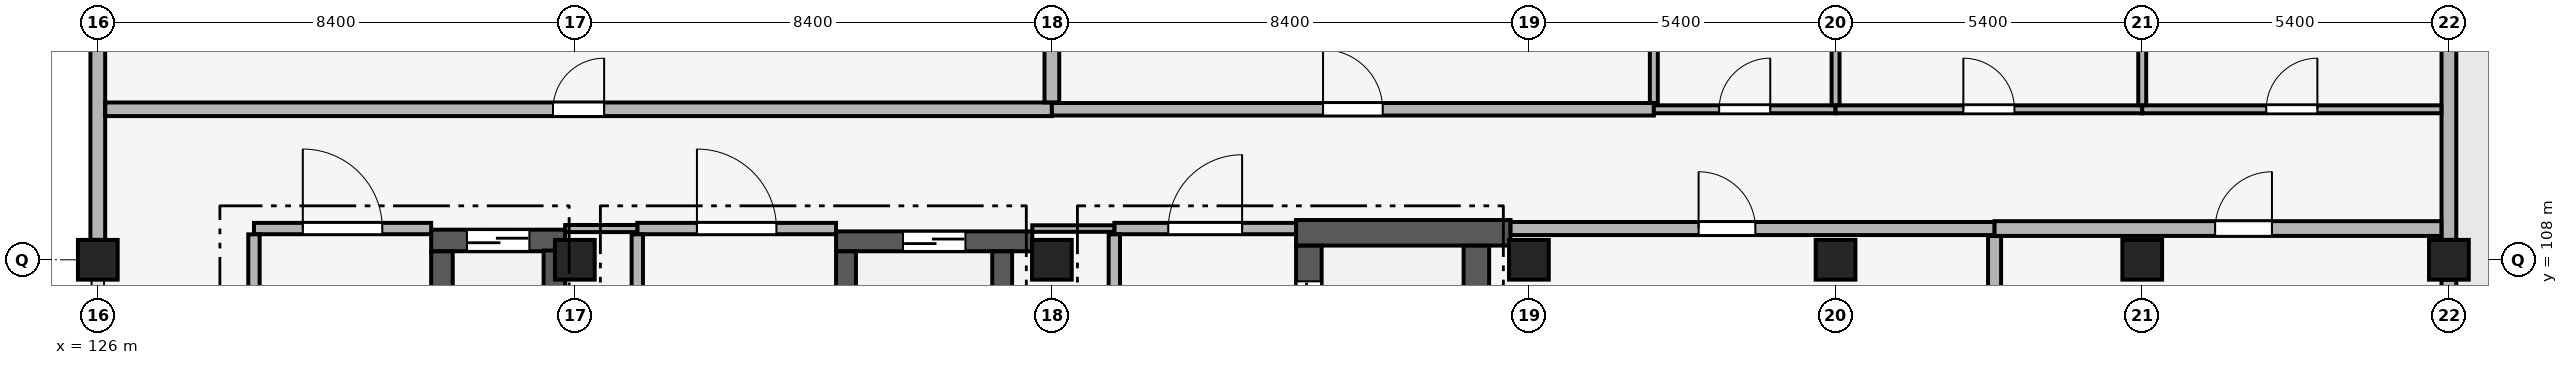
"""IFC4 building model, lengths in metres.
Left out: names, types, materials, properties, quantities, classifications, styles, units other than length and angle.
Written with IfcOpenShell. Run it as: python <this file> out.ifc"""

import sys

from ifc_helpers import new_model, si_unit, direction, frame, frame_2d, origin, origin_2d, place, context, subcontext, project, spatial, rectangle, extrude, element, fill, save


model = new_model("IFC4")
c1 = context("Model", 3, precision=1e-05, world=origin(), true_north=direction((0.0, 1.0)))
c2 = subcontext(c1, "Body", "Model", "MODEL_VIEW")
j1 = project(units=[si_unit("LENGTHUNIT", "METRE"), si_unit("PLANEANGLEUNIT", "RADIAN")], contexts=[c1])
p1 = place(None, origin())
s1 = spatial("IfcSite", under=j1, at=p1, CompositionType="ELEMENT")
p2 = place(p1, origin())
s2 = spatial("IfcBuilding", under=s1, at=p2, CompositionType="ELEMENT")
p3 = place(p2, frame((0.0, 0.0, 29.4)))
s3 = spatial("IfcBuildingStorey", under=s2, at=p3, CompositionType="ELEMENT", Elevation=29.4)
for number, where, z_axis, x_axis in (
    (1, (126.0, 108.0, 0.0), (0.0, 0.0, 1.0), (1.0, 0.0, 0.0)),
    (2, (134.4, 108.0, 0.0), (0.0, 0.0, 1.0), (1.0, 0.0, 0.0)),
    (3, (142.8, 108.0, 0.0), (0.0, 0.0, 1.0), (1.0, 0.0, 0.0)),
    (4, (151.2, 108.0, 0.0), (0.0, 0.0, 1.0), (1.0, 0.0, 0.0)),
    (5, (156.6, 108.0, 0.0), (0.0, 0.0, 1.0), (1.0, 0.0, 0.0)),
    (6, (162.0, 108.0, 0.0), (0.0, 0.0, 1.0), (1.0, 0.0, 0.0)),
    (7, (167.4, 108.0, 0.0), (0.0, 0.0, 1.0), (1.0, 0.0, 0.0)),
):
    element("IfcColumn", number, at=place(p3, frame(where, z_axis=z_axis, x_axis=x_axis)), inside=s3, PredefinedType="COLUMN", context=c2, shape_type="SweptSolid", body=[
        extrude(rectangle(XDim=0.7, YDim=0.7, at=origin_2d()), origin(), (0.0, 0.0, 1.0), 4.2),
    ])
for number, where, z_axis, x_axis in (
    (8, (126.0, 108.35, 0.0), (0.0, 0.0, 1.0), (0.0, 1.0, 0.0)),
    (9, (167.4, 113.05, 0.0), (0.0, 0.0, 1.0), (0.0, -1.0, 0.0)),
):
    element("IfcWall", number, at=place(p3, frame(where, z_axis=z_axis, x_axis=x_axis)), inside=s3, PredefinedType="SOLIDWALL", context=c2, shape_type="SweptSolid", body=[
        extrude(rectangle(XDim=4.7, YDim=0.26, at=frame_2d((2.35, 0.0))), origin(), (0.0, 0.0, 1.0), 3.4),
    ])
p4 = place(p3, frame((167.4, 107.65, 0.0), z_axis=(0.0, 0.0, 1.0), x_axis=(0.0, -1.0, 0.0)))
e10 = element("IfcWall", 10, at=p4, inside=s3, PredefinedType="SOLIDWALL", context=c2, shape_type="SweptSolid", body=[
    extrude(rectangle(XDim=7.7, YDim=0.26, at=frame_2d((3.85, 0.0))), origin(), (0.0, 0.0, 1.0), 3.25),
])
p5 = place(p4, frame((2.95, 0.0, 0.0)))
e11 = element("IfcOpeningElement", 11, at=p5, cuts=e10, PredefinedType="OPENING", context=c2, shape_type="SweptSolid", body=[
    extrude(rectangle(XDim=1.8, YDim=2.2, at=frame_2d((0.9, 1.1))), frame((0.0, 0.145, 0.0), z_axis=(0.0, -1.0, 0.0), x_axis=(1.0, 0.0, 0.0)), (0.0, 0.0, 1.0), 0.29),
])
p6 = place(p3, frame((131.87, 108.34, 0.0), z_axis=(0.0, 0.0, 1.0), x_axis=(1.0, 0.0, 0.0)))
e12 = element("IfcWall", 12, at=p6, inside=s3, PredefinedType="SHEAR", context=c2, shape_type="SweptSolid", body=[
    extrude(rectangle(XDim=2.36, YDim=0.38, at=frame_2d((1.18, 0.0))), origin(), (0.0, 0.0, 1.0), 3.95),
])
p7 = place(p6, frame((0.63, 0.0, 0.0)))
e13 = element("IfcOpeningElement", 13, at=p7, cuts=e12, PredefinedType="OPENING", context=c2, shape_type="SweptSolid", body=[
    extrude(rectangle(XDim=1.1, YDim=2.15, at=frame_2d((0.55, 1.075))), frame((0.0, 0.205, 0.0), z_axis=(0.0, -1.0, 0.0), x_axis=(1.0, 0.0, 0.0)), (0.0, 0.0, 1.0), 0.41),
])
p8 = place(p3, frame((132.06, 106.093, 0.0), z_axis=(0.0, 0.0, 1.0), x_axis=(0.0, 1.0, 0.0)))
e14 = element("IfcWall", 14, at=p8, inside=s3, PredefinedType="SHEAR", context=c2, shape_type="SweptSolid", body=[
    extrude(rectangle(XDim=2.055, YDim=0.38, at=frame_2d((1.027, 0.0))), origin(), (0.0, 0.0, 1.0), 3.95),
])
p9 = place(p3, frame((134.04, 106.093, 0.0), z_axis=(0.0, 0.0, 1.0), x_axis=(0.0, 1.0, 0.0)))
e15 = element("IfcWall", 15, at=p9, inside=s3, PredefinedType="SHEAR", context=c2, shape_type="SweptSolid", body=[
    extrude(rectangle(XDim=2.07, YDim=0.38, at=frame_2d((1.035, 0.0))), origin(), (0.0, 0.0, 1.0), 3.95),
])
p10 = place(p3, frame((139.0, 108.325, 0.0), z_axis=(0.0, 0.0, 1.0), x_axis=(1.0, 0.0, 0.0)))
e16 = element("IfcWall", 16, at=p10, inside=s3, PredefinedType="SHEAR", context=c2, shape_type="SweptSolid", body=[
    extrude(rectangle(XDim=3.455, YDim=0.35, at=frame_2d((1.728, 0.0))), origin(), (0.0, 0.0, 1.0), 3.95),
])
p11 = place(p10, frame((1.178, 0.0, 0.0)))
e17 = element("IfcOpeningElement", 17, at=p11, cuts=e16, PredefinedType="OPENING", context=c2, shape_type="SweptSolid", body=[
    extrude(rectangle(XDim=1.1, YDim=2.15, at=frame_2d((0.55, 1.075))), frame((0.0, 0.19, 0.0), z_axis=(0.0, -1.0, 0.0), x_axis=(1.0, 0.0, 0.0)), (0.0, 0.0, 1.0), 0.38),
])
for number, where, z_axis, x_axis in (
    (18, (139.175, 106.093, 0.0), (0.0, 0.0, 1.0), (0.0, 1.0, 0.0)),
    (19, (141.925, 106.093, 0.0), (0.0, 0.0, 1.0), (0.0, 1.0, 0.0)),
):
    element("IfcWall", number, at=place(p3, frame(where, z_axis=z_axis, x_axis=x_axis)), inside=s3, PredefinedType="SHEAR", context=c2, shape_type="SweptSolid", body=[
        extrude(rectangle(XDim=2.055, YDim=0.35, at=frame_2d((1.027, 0.0))), origin(), (0.0, 0.0, 1.0), 3.95),
    ])
p12 = place(p3, frame((147.1, 108.475, 0.0), z_axis=(0.0, 0.0, 1.0), x_axis=(1.0, 0.0, 0.0)))
e20 = element("IfcWall", 20, at=p12, inside=s3, PredefinedType="SHEAR", context=c2, shape_type="SweptSolid", body=[
    extrude(rectangle(XDim=3.777, YDim=0.45, at=frame_2d((1.888, 0.0))), origin(), (0.0, 0.0, 1.0), 3.95),
])
p13 = place(p3, frame((147.325, 105.793, 0.0), z_axis=(0.0, 0.0, 1.0), x_axis=(0.0, 1.0, 0.0)))
e21 = element("IfcWall", 21, at=p13, inside=s3, PredefinedType="SHEAR", context=c2, shape_type="SweptSolid", body=[
    extrude(rectangle(XDim=2.455, YDim=0.45, at=frame_2d((1.228, 0.0))), origin(), (0.0, 0.0, 1.0), 3.95),
])
p14 = place(p13, frame((0.627, 0.0, 0.0)))
e22 = element("IfcOpeningElement", 22, at=p14, cuts=e21, PredefinedType="OPENING", context=c2, shape_type="SweptSolid", body=[
    extrude(rectangle(XDim=1.2, YDim=2.15, at=frame_2d((0.6, 1.075))), frame((0.0, 0.24, 0.0), z_axis=(0.0, -1.0, 0.0), x_axis=(1.0, 0.0, 0.0)), (0.0, 0.0, 1.0), 0.48),
])
p15 = place(p3, frame((150.275, 105.793, 0.0), z_axis=(0.0, 0.0, 1.0), x_axis=(0.0, 1.0, 0.0)))
e23 = element("IfcWall", 23, at=p15, inside=s3, PredefinedType="SHEAR", context=c2, shape_type="SweptSolid", body=[
    extrude(rectangle(XDim=2.455, YDim=0.45, at=frame_2d((1.228, 0.0))), origin(), (0.0, 0.0, 1.0), 3.95),
])
p16 = place(p3, frame((128.75, 108.55, 0.0), z_axis=(0.0, 0.0, 1.0), x_axis=(1.0, 0.0, 0.0)))
e24 = element("IfcWall", 24, at=p16, inside=s3, PredefinedType="PARTITIONING", context=c2, shape_type="SweptSolid", body=[
    extrude(rectangle(XDim=3.12, YDim=0.2, at=frame_2d((1.56, 0.0))), origin(), (0.0, 0.0, 1.0), 3.95),
])
p17 = place(p16, frame((0.86, 0.0, 0.0)))
e25 = element("IfcOpeningElement", 25, at=p17, cuts=e24, PredefinedType="OPENING", context=c2, shape_type="SweptSolid", body=[
    extrude(rectangle(XDim=1.4, YDim=2.2, at=frame_2d((0.7, 1.1))), frame((0.0, 0.115, 0.0), z_axis=(0.0, -1.0, 0.0), x_axis=(1.0, 0.0, 0.0)), (0.0, 0.0, 1.0), 0.23),
])
p18 = place(p3, frame((135.5, 108.55, 0.0), z_axis=(0.0, 0.0, 1.0), x_axis=(1.0, 0.0, 0.0)))
e26 = element("IfcWall", 26, at=p18, inside=s3, PredefinedType="PARTITIONING", context=c2, shape_type="SweptSolid", body=[
    extrude(rectangle(XDim=3.5, YDim=0.2, at=frame_2d((1.75, 0.0))), origin(), (0.0, 0.0, 1.0), 3.95),
])
p19 = place(p18, frame((1.05, 0.0, 0.0)))
e27 = element("IfcOpeningElement", 27, at=p19, cuts=e26, PredefinedType="OPENING", context=c2, shape_type="SweptSolid", body=[
    extrude(rectangle(XDim=1.4, YDim=2.2, at=frame_2d((0.7, 1.1))), frame((0.0, 0.115, 0.0), z_axis=(0.0, -1.0, 0.0), x_axis=(1.0, 0.0, 0.0)), (0.0, 0.0, 1.0), 0.23),
])
p20 = place(p3, frame((143.9, 108.55, 0.0), z_axis=(0.0, 0.0, 1.0), x_axis=(1.0, 0.0, 0.0)))
e28 = element("IfcWall", 28, at=p20, inside=s3, PredefinedType="PARTITIONING", context=c2, shape_type="SweptSolid", body=[
    extrude(rectangle(XDim=3.2, YDim=0.2, at=frame_2d((1.6, 0.0))), origin(), (0.0, 0.0, 1.0), 3.95),
])
p21 = place(p20, frame((0.95, 0.0, 0.0)))
e29 = element("IfcOpeningElement", 29, at=p21, cuts=e28, PredefinedType="OPENING", context=c2, shape_type="SweptSolid", body=[
    extrude(rectangle(XDim=1.3, YDim=2.2, at=frame_2d((0.65, 1.1))), frame((0.0, 0.115, 0.0), z_axis=(0.0, -1.0, 0.0), x_axis=(1.0, 0.0, 0.0)), (0.0, 0.0, 1.0), 0.23),
])
p22 = place(p3, frame((134.23, 108.55, 0.0), z_axis=(0.0, 0.0, 1.0), x_axis=(1.0, 0.0, 0.0)))
e30 = element("IfcWall", 30, at=p22, inside=s3, PredefinedType="PARTITIONING", context=c2, shape_type="SweptSolid", body=[
    extrude(rectangle(XDim=1.27, YDim=0.125, at=frame_2d((0.635, 0.0))), origin(), (0.0, 0.0, 1.0), 3.4),
])
p23 = place(p3, frame((142.455, 108.55, 0.0), z_axis=(0.0, 0.0, 1.0), x_axis=(1.0, 0.0, 0.0)))
e31 = element("IfcWall", 31, at=p23, inside=s3, PredefinedType="PARTITIONING", context=c2, shape_type="SweptSolid", body=[
    extrude(rectangle(XDim=1.445, YDim=0.115, at=frame_2d((0.722, 0.0))), origin(), (0.0, 0.0, 1.0), 3.4),
])
p24 = place(p3, frame((150.877, 108.55, 0.0), z_axis=(0.0, 0.0, 1.0), x_axis=(1.0, 0.0, 0.0)))
e32 = element("IfcWall", 32, at=p24, inside=s3, PredefinedType="SOLIDWALL", context=c2, shape_type="SweptSolid", body=[
    extrude(rectangle(XDim=8.523, YDim=0.23, at=frame_2d((4.261, 0.0))), origin(), (0.0, 0.0, 1.0), 3.4),
])
p25 = place(p24, frame((3.311, 0.0, 0.0)))
e33 = element("IfcOpeningElement", 33, at=p25, cuts=e32, PredefinedType="OPENING", context=c2, shape_type="SweptSolid", body=[
    extrude(rectangle(XDim=1.0, YDim=2.2, at=frame_2d((0.5, 1.1))), frame((0.0, 0.13, 0.0), z_axis=(0.0, -1.0, 0.0), x_axis=(1.0, 0.0, 0.0)), (0.0, 0.0, 1.0), 0.26),
])
p26 = place(p3, frame((159.4, 108.55, 0.0), z_axis=(0.0, 0.0, 1.0), x_axis=(1.0, 0.0, 0.0)))
e34 = element("IfcWall", 34, at=p26, inside=s3, PredefinedType="PARTITIONING", context=c2, shape_type="SweptSolid", body=[
    extrude(rectangle(XDim=7.868, YDim=0.26, at=frame_2d((3.934, 0.0))), origin(), (0.0, 0.0, 1.0), 3.4),
])
p27 = place(p26, frame((3.884, 0.0, 0.0)))
e35 = element("IfcOpeningElement", 35, at=p27, cuts=e34, PredefinedType="OPENING", context=c2, shape_type="SweptSolid", body=[
    extrude(rectangle(XDim=1.0, YDim=2.1, at=frame_2d((0.5, 1.05))), frame((0.0, 0.145, 0.0), z_axis=(0.0, -1.0, 0.0), x_axis=(1.0, 0.0, 0.0)), (0.0, 0.0, 1.0), 0.29),
])
p28 = place(p3, frame((126.132, 110.65, 0.0), z_axis=(0.0, 0.0, 1.0), x_axis=(1.0, 0.0, 0.0)))
e36 = element("IfcWall", 36, at=p28, inside=s3, PredefinedType="PARTITIONING", context=c2, shape_type="SweptSolid", body=[
    extrude(rectangle(XDim=16.668, YDim=0.24, at=frame_2d((8.334, 0.0))), origin(), (0.0, 0.0, 1.0), 3.4),
])
p29 = place(p28, frame((7.884, 0.0, 0.0)))
e37 = element("IfcOpeningElement", 37, at=p29, cuts=e36, PredefinedType="OPENING", context=c2, shape_type="SweptSolid", body=[
    extrude(rectangle(XDim=0.9, YDim=2.1, at=frame_2d((0.45, 1.05))), frame((0.0, 0.135, 0.0), z_axis=(0.0, -1.0, 0.0), x_axis=(1.0, 0.0, 0.0)), (0.0, 0.0, 1.0), 0.27),
])
p30 = place(p3, frame((142.8, 110.65, 0.0), z_axis=(0.0, 0.0, 1.0), x_axis=(1.0, 0.0, 0.0)))
e38 = element("IfcWall", 38, at=p30, inside=s3, PredefinedType="PARTITIONING", context=c2, shape_type="SweptSolid", body=[
    extrude(rectangle(XDim=10.6, YDim=0.22, at=frame_2d((5.3, 0.0))), origin(), (0.0, 0.0, 1.0), 3.4),
])
p31 = place(p30, frame((4.775, 0.0, 0.0)))
e39 = element("IfcOpeningElement", 39, at=p31, cuts=e38, PredefinedType="OPENING", context=c2, shape_type="SweptSolid", body=[
    extrude(rectangle(XDim=1.05, YDim=2.1, at=frame_2d((0.525, 1.05))), frame((0.0, 0.125, 0.0), z_axis=(0.0, -1.0, 0.0), x_axis=(1.0, 0.0, 0.0)), (0.0, 0.0, 1.0), 0.25),
])
p32 = place(p3, frame((153.4, 110.65, 0.0), z_axis=(0.0, 0.0, 1.0), x_axis=(1.0, 0.0, 0.0)))
e40 = element("IfcWall", 40, at=p32, inside=s3, PredefinedType="PARTITIONING", context=c2, shape_type="SweptSolid", body=[
    extrude(rectangle(XDim=3.2, YDim=0.14, at=frame_2d((1.6, 0.0))), origin(), (0.0, 0.0, 1.0), 3.4),
])
p33 = place(p32, frame((1.15, 0.0, 0.0)))
e41 = element("IfcOpeningElement", 41, at=p33, cuts=e40, PredefinedType="OPENING", context=c2, shape_type="SweptSolid", body=[
    extrude(rectangle(XDim=0.9, YDim=2.1, at=frame_2d((0.45, 1.05))), frame((0.0, 0.085, 0.0), z_axis=(0.0, -1.0, 0.0), x_axis=(1.0, 0.0, 0.0)), (0.0, 0.0, 1.0), 0.17),
])
p34 = place(p3, frame((156.6, 110.65, 0.0), z_axis=(0.0, 0.0, 1.0), x_axis=(1.0, 0.0, 0.0)))
e42 = element("IfcWall", 42, at=p34, inside=s3, PredefinedType="PARTITIONING", context=c2, shape_type="SweptSolid", body=[
    extrude(rectangle(XDim=5.4, YDim=0.14, at=frame_2d((2.7, 0.0))), origin(), (0.0, 0.0, 1.0), 3.4),
])
p35 = place(p34, frame((2.25, 0.0, 0.0)))
e43 = element("IfcOpeningElement", 43, at=p35, cuts=e42, PredefinedType="OPENING", context=c2, shape_type="SweptSolid", body=[
    extrude(rectangle(XDim=0.9, YDim=2.1, at=frame_2d((0.45, 1.05))), frame((0.0, 0.085, 0.0), z_axis=(0.0, -1.0, 0.0), x_axis=(1.0, 0.0, 0.0)), (0.0, 0.0, 1.0), 0.17),
])
p36 = place(p3, frame((162.0, 110.65, 0.0), z_axis=(0.0, 0.0, 1.0), x_axis=(1.0, 0.0, 0.0)))
e44 = element("IfcWall", 44, at=p36, inside=s3, PredefinedType="PARTITIONING", context=c2, shape_type="SweptSolid", body=[
    extrude(rectangle(XDim=5.268, YDim=0.14, at=frame_2d((2.634, 0.0))), origin(), (0.0, 0.0, 1.0), 3.4),
])
p37 = place(p36, frame((2.184, 0.0, 0.0)))
e45 = element("IfcOpeningElement", 45, at=p37, cuts=e44, PredefinedType="OPENING", context=c2, shape_type="SweptSolid", body=[
    extrude(rectangle(XDim=0.9, YDim=2.1, at=frame_2d((0.45, 1.05))), frame((0.0, 0.085, 0.0), z_axis=(0.0, -1.0, 0.0), x_axis=(1.0, 0.0, 0.0)), (0.0, 0.0, 1.0), 0.17),
])
p38 = place(p3, frame((128.75, 103.632, 0.0), z_axis=(0.0, 0.0, 1.0), x_axis=(0.0, 1.0, 0.0)))
e46 = element("IfcWall", 46, at=p38, inside=s3, PredefinedType="PARTITIONING", context=c2, shape_type="SweptSolid", body=[
    extrude(rectangle(XDim=4.816, YDim=0.2, at=frame_2d((2.408, 0.0))), origin(), (0.0, 0.0, 1.0), 3.95),
])
p39 = place(p3, frame((135.5, 103.602, 0.0), z_axis=(0.0, 0.0, 1.0), x_axis=(0.0, 1.0, 0.0)))
e47 = element("IfcWall", 47, at=p39, inside=s3, PredefinedType="PARTITIONING", context=c2, shape_type="SweptSolid", body=[
    extrude(rectangle(XDim=4.846, YDim=0.2, at=frame_2d((2.423, 0.0))), origin(), (0.0, 0.0, 1.0), 3.95),
])
p40 = place(p3, frame((142.8, 110.772, 0.0), z_axis=(0.0, 0.0, 1.0), x_axis=(0.0, 1.0, 0.0)))
e48 = element("IfcWall", 48, at=p40, inside=s3, PredefinedType="PARTITIONING", context=c2, shape_type="SweptSolid", body=[
    extrude(rectangle(XDim=8.126, YDim=0.26, at=frame_2d((4.063, 0.0))), origin(), (0.0, 0.0, 1.0), 3.4),
])
p41 = place(p3, frame((143.9, 103.702, 0.0), z_axis=(0.0, 0.0, 1.0), x_axis=(0.0, 1.0, 0.0)))
e49 = element("IfcWall", 49, at=p41, inside=s3, PredefinedType="PARTITIONING", context=c2, shape_type="SweptSolid", body=[
    extrude(rectangle(XDim=4.746, YDim=0.2, at=frame_2d((2.373, 0.0))), origin(), (0.0, 0.0, 1.0), 3.95),
])
p42 = place(p3, frame((153.4, 110.762, 0.0), z_axis=(0.0, 0.0, 1.0), x_axis=(0.0, 1.0, 0.0)))
e50 = element("IfcWall", 50, at=p42, inside=s3, PredefinedType="PARTITIONING", context=c2, shape_type="SweptSolid", body=[
    extrude(rectangle(XDim=7.906, YDim=0.14, at=frame_2d((3.953, 0.0))), origin(), (0.0, 0.0, 1.0), 3.35),
])
p43 = place(p3, frame((156.6, 110.722, 0.0), z_axis=(0.0, 0.0, 1.0), x_axis=(0.0, 1.0, 0.0)))
e51 = element("IfcWall", 51, at=p43, inside=s3, PredefinedType="PARTITIONING", context=c2, shape_type="SweptSolid", body=[
    extrude(rectangle(XDim=8.156, YDim=0.14, at=frame_2d((4.078, 0.0))), origin(), (0.0, 0.0, 1.0), 3.4),
])
p44 = place(p3, frame((159.4, 93.732, 0.0), z_axis=(0.0, 0.0, 1.0), x_axis=(0.0, 1.0, 0.0)))
e52 = element("IfcWall", 52, at=p44, inside=s3, PredefinedType="SOLIDWALL", context=c2, shape_type="SweptSolid", body=[
    extrude(rectangle(XDim=14.686, YDim=0.23, at=frame_2d((7.343, 0.0))), origin(), (0.0, 0.0, 1.0), 3.35),
])
p45 = place(p3, frame((162.0, 110.722, 0.0), z_axis=(0.0, 0.0, 1.0), x_axis=(0.0, 1.0, 0.0)))
e53 = element("IfcWall", 53, at=p45, inside=s3, PredefinedType="PARTITIONING", context=c2, shape_type="SweptSolid", body=[
    extrude(rectangle(XDim=8.176, YDim=0.14, at=frame_2d((4.088, 0.0))), origin(), (0.0, 0.0, 1.0), 3.4),
])
p46 = place(p7, origin())
e54 = element("IfcDoor", 54, at=p46, inside=s3, OperationType="DOUBLE_DOOR_SLIDING", PredefinedType="DOOR", context=c2, shape_type="SweptSolid", body=[
    extrude(rectangle(XDim=1.1, YDim=2.15, at=frame_2d((0.55, 1.075))), frame((0.0, 0.025, 0.0), z_axis=(0.0, -1.0, 0.0), x_axis=(1.0, 0.0, 0.0)), (0.0, 0.0, 1.0), 0.05),
])
fill(e13, e54)
p47 = place(p11, origin())
e55 = element("IfcDoor", 55, at=p47, inside=s3, OperationType="DOUBLE_DOOR_SLIDING", PredefinedType="DOOR", context=c2, shape_type="SweptSolid", body=[
    extrude(rectangle(XDim=1.1, YDim=2.15, at=frame_2d((0.55, 1.075))), frame((0.0, 0.025, 0.0), z_axis=(0.0, -1.0, 0.0), x_axis=(1.0, 0.0, 0.0)), (0.0, 0.0, 1.0), 0.05),
])
fill(e17, e55)
p48 = place(p14, origin())
e56 = element("IfcDoor", 56, at=p48, inside=s3, OperationType="DOUBLE_DOOR_SLIDING", PredefinedType="DOOR", context=c2, shape_type="SweptSolid", body=[
    extrude(rectangle(XDim=1.2, YDim=2.15, at=frame_2d((0.6, 1.075))), frame((0.0, 0.025, 0.0), z_axis=(0.0, -1.0, 0.0), x_axis=(1.0, 0.0, 0.0)), (0.0, 0.0, 1.0), 0.05),
])
fill(e22, e56)
p49 = place(p17, origin())
e57 = element("IfcDoor", 57, at=p49, inside=s3, OperationType="SINGLE_SWING_LEFT", PredefinedType="DOOR", context=c2, shape_type="SweptSolid", body=[
    extrude(rectangle(XDim=1.4, YDim=2.2, at=frame_2d((0.7, 1.1))), frame((0.0, 0.025, 0.0), z_axis=(0.0, -1.0, 0.0), x_axis=(1.0, 0.0, 0.0)), (0.0, 0.0, 1.0), 0.05),
])
fill(e25, e57)
p50 = place(p19, origin())
e58 = element("IfcDoor", 58, at=p50, inside=s3, OperationType="SINGLE_SWING_LEFT", PredefinedType="DOOR", context=c2, shape_type="SweptSolid", body=[
    extrude(rectangle(XDim=1.4, YDim=2.2, at=frame_2d((0.7, 1.1))), frame((0.0, 0.025, 0.0), z_axis=(0.0, -1.0, 0.0), x_axis=(1.0, 0.0, 0.0)), (0.0, 0.0, 1.0), 0.05),
])
fill(e27, e58)
p51 = place(p21, origin())
e59 = element("IfcDoor", 59, at=p51, inside=s3, OperationType="SINGLE_SWING_RIGHT", PredefinedType="DOOR", context=c2, shape_type="SweptSolid", body=[
    extrude(rectangle(XDim=1.3, YDim=2.2, at=frame_2d((0.65, 1.1))), frame((0.0, 0.025, 0.0), z_axis=(0.0, -1.0, 0.0), x_axis=(1.0, 0.0, 0.0)), (0.0, 0.0, 1.0), 0.05),
])
fill(e29, e59)
p52 = place(p29, origin())
e60 = element("IfcDoor", 60, at=p52, inside=s3, OperationType="SINGLE_SWING_RIGHT", PredefinedType="DOOR", context=c2, shape_type="SweptSolid", body=[
    extrude(rectangle(XDim=0.9, YDim=2.1, at=frame_2d((0.45, 1.05))), frame((0.0, 0.025, 0.0), z_axis=(0.0, -1.0, 0.0), x_axis=(1.0, 0.0, 0.0)), (0.0, 0.0, 1.0), 0.05),
])
fill(e37, e60)
p53 = place(p31, origin())
e61 = element("IfcDoor", 61, at=p53, inside=s3, OperationType="SINGLE_SWING_LEFT", PredefinedType="DOOR", context=c2, shape_type="SweptSolid", body=[
    extrude(rectangle(XDim=1.05, YDim=2.1, at=frame_2d((0.525, 1.05))), frame((0.0, 0.025, 0.0), z_axis=(0.0, -1.0, 0.0), x_axis=(1.0, 0.0, 0.0)), (0.0, 0.0, 1.0), 0.05),
])
fill(e39, e61)
p54 = place(p33, origin())
e62 = element("IfcDoor", 62, at=p54, inside=s3, OperationType="SINGLE_SWING_RIGHT", PredefinedType="DOOR", context=c2, shape_type="SweptSolid", body=[
    extrude(rectangle(XDim=0.9, YDim=2.1, at=frame_2d((0.45, 1.05))), frame((0.0, 0.025, 0.0), z_axis=(0.0, -1.0, 0.0), x_axis=(1.0, 0.0, 0.0)), (0.0, 0.0, 1.0), 0.05),
])
fill(e41, e62)
p55 = place(p35, origin())
e63 = element("IfcDoor", 63, at=p55, inside=s3, OperationType="SINGLE_SWING_LEFT", PredefinedType="DOOR", context=c2, shape_type="SweptSolid", body=[
    extrude(rectangle(XDim=0.9, YDim=2.1, at=frame_2d((0.45, 1.05))), frame((0.0, 0.025, 0.0), z_axis=(0.0, -1.0, 0.0), x_axis=(1.0, 0.0, 0.0)), (0.0, 0.0, 1.0), 0.05),
])
fill(e43, e63)
p56 = place(p37, origin())
e64 = element("IfcDoor", 64, at=p56, inside=s3, OperationType="SINGLE_SWING_RIGHT", PredefinedType="DOOR", context=c2, shape_type="SweptSolid", body=[
    extrude(rectangle(XDim=0.9, YDim=2.1, at=frame_2d((0.45, 1.05))), frame((0.0, 0.025, 0.0), z_axis=(0.0, -1.0, 0.0), x_axis=(1.0, 0.0, 0.0)), (0.0, 0.0, 1.0), 0.05),
])
fill(e45, e64)
p57 = place(p25, origin())
e65 = element("IfcDoor", 65, at=p57, inside=s3, OperationType="SINGLE_SWING_LEFT", PredefinedType="DOOR", context=c2, shape_type="SweptSolid", body=[
    extrude(rectangle(XDim=1.0, YDim=2.2, at=frame_2d((0.5, 1.1))), frame((0.0, 0.025, 0.0), z_axis=(0.0, -1.0, 0.0), x_axis=(1.0, 0.0, 0.0)), (0.0, 0.0, 1.0), 0.05),
])
fill(e33, e65)
p58 = place(p27, origin())
e66 = element("IfcDoor", 66, at=p58, inside=s3, OperationType="SINGLE_SWING_RIGHT", PredefinedType="DOOR", context=c2, shape_type="SweptSolid", body=[
    extrude(rectangle(XDim=1.0, YDim=2.1, at=frame_2d((0.5, 1.05))), frame((0.0, 0.025, 0.0), z_axis=(0.0, -1.0, 0.0), x_axis=(1.0, 0.0, 0.0)), (0.0, 0.0, 1.0), 0.05),
])
fill(e35, e66)
save(model, sys.argv[1])
